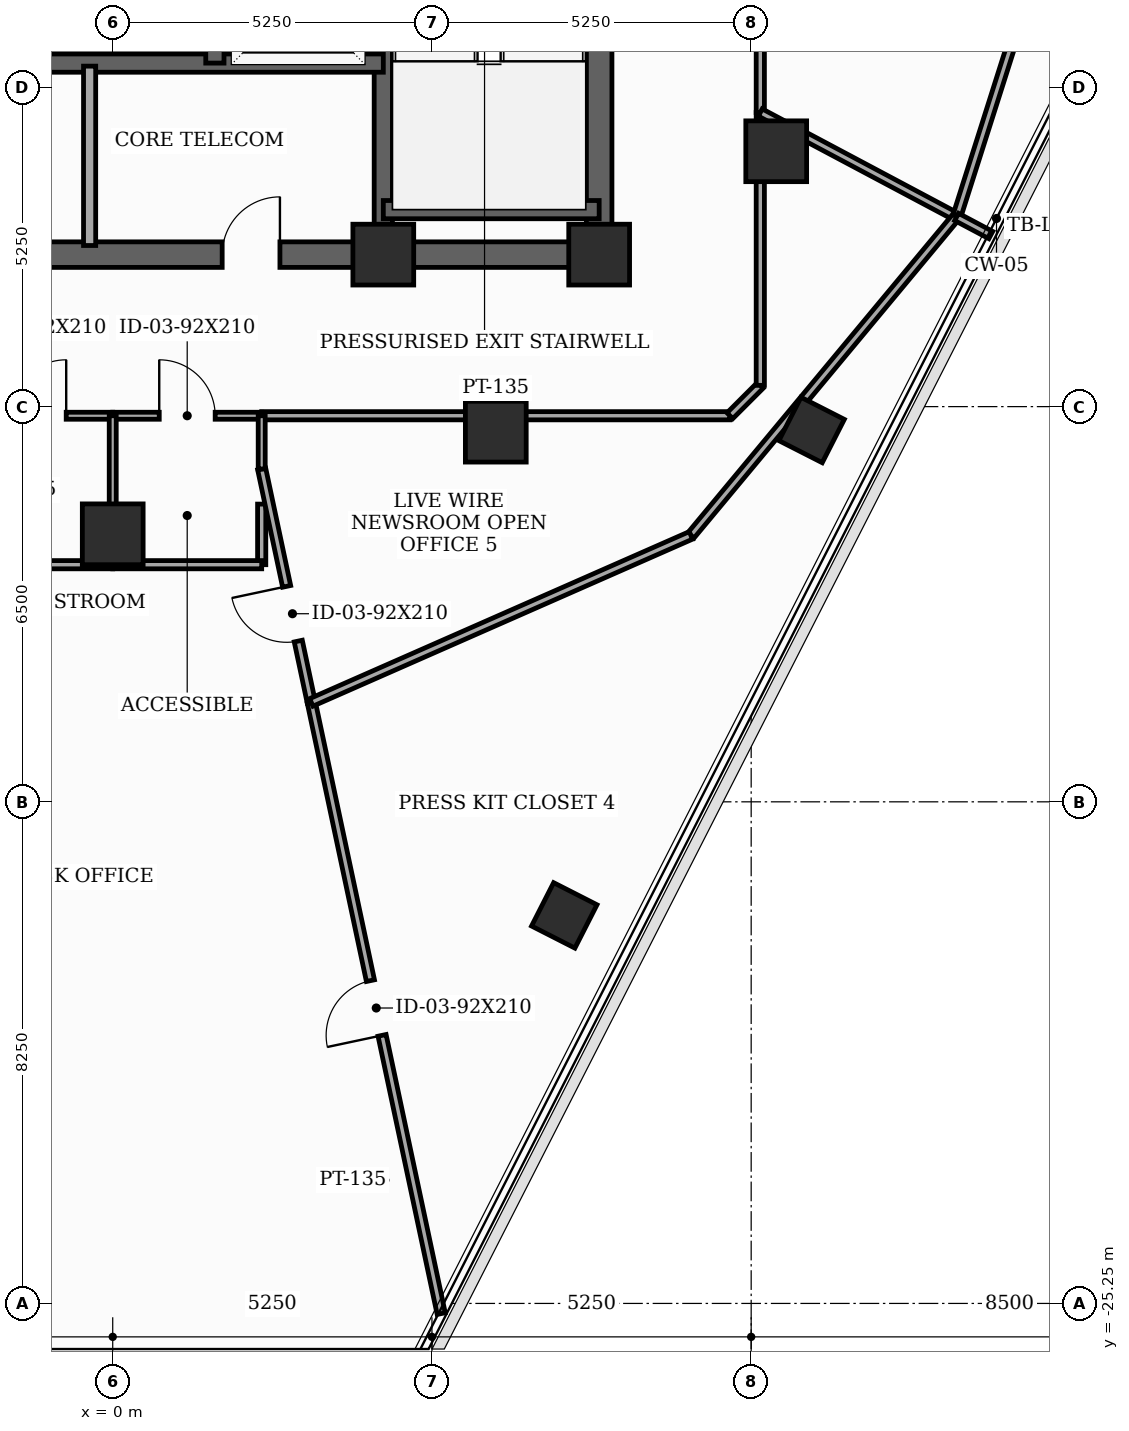
"""IFC4 building model, lengths in metres.
Left out: names, types, materials, properties, quantities, classifications, styles, units other than length and angle.
Written with IfcOpenShell. Run it as: python <this file> out.ifc"""

import sys

from ifc_helpers import new_model, si_unit, direction, frame, frame_2d, origin, origin_2d, place, context, subcontext, project, spatial, rectangle, extrude, element, fill, save


model = new_model("IFC4")
c1 = context("Model", 3, precision=1e-05, world=origin(), true_north=direction((0.0, 1.0)))
c2 = subcontext(c1, "Body", "Model", "MODEL_VIEW")
j1 = project(units=[si_unit("LENGTHUNIT", "METRE"), si_unit("PLANEANGLEUNIT", "RADIAN")], contexts=[c1])
p1 = place(None, origin())
s1 = spatial("IfcSite", under=j1, at=p1, CompositionType="ELEMENT")
p2 = place(p1, origin())
s2 = spatial("IfcBuilding", under=s1, at=p2, CompositionType="ELEMENT")
p3 = place(p2, frame((0.0, 0.0, 259.6)))
s3 = spatial("IfcBuildingStorey", under=s2, at=p3, CompositionType="ELEMENT", Elevation=259.6)
for number, where, z_axis, x_axis in (
    (1, (4.45, -8.0, 0.0), (0.0, 0.0, 1.0), (1.0, 0.0, 0.0)),
    (2, (8.0, -8.0, 0.0), (0.0, 0.0, 1.0), (1.0, 0.0, 0.0)),
    (3, (0.0, -12.6, 0.0), (0.0, 0.0, 1.0), (1.0, 0.0, 0.0)),
    (4, (6.3, -10.912, 0.0), (0.0, 0.0, 1.0), (1.0, 0.0, 0.0)),
    (5, (10.912, -6.3, 0.0), (0.0, 0.0, 1.0), (1.0, 0.0, 0.0)),
):
    element("IfcColumn", number, at=place(p3, frame(where, z_axis=z_axis, x_axis=x_axis)), inside=s3, PredefinedType="COLUMN", context=c2, shape_type="SweptSolid", body=[
        extrude(rectangle(XDim=1.0, YDim=1.0, at=origin_2d()), origin(), (0.0, 0.0, 1.0), 3.7),
    ])
for number, where, z_axis, x_axis in (
    (6, (7.426, -18.868, 0.0), (0.0, 0.0, 1.0), (0.454, 0.891, 0.0)),
    (7, (11.494, -10.885, 0.0), (0.0, 0.0, 1.0), (0.454, 0.891, 0.0)),
):
    element("IfcColumn", number, at=place(p3, frame(where, z_axis=z_axis, x_axis=x_axis)), inside=s3, PredefinedType="COLUMN", context=c2, shape_type="SweptSolid", body=[
        extrude(rectangle(XDim=0.8, YDim=0.8, at=origin_2d()), origin(), (0.0, 0.0, 1.0), 3.7),
    ])
p4 = place(p3, frame((8.0, -8.0, 0.0), z_axis=(0.0, 0.0, 1.0), x_axis=(0.0, 1.0, 0.0)))
e8 = element("IfcWall", 8, at=p4, inside=s3, PredefinedType="SHEAR", context=c2, shape_type="SweptSolid", body=[
    extrude(rectangle(XDim=16.0, YDim=0.42, at=frame_2d((8.0, 0.0))), origin(), (0.0, 0.0, 1.0), 3.5),
])
p5 = place(p4, frame((9.6, 0.0, 0.0)))
e9 = element("IfcOpeningElement", 9, at=p5, cuts=e8, PredefinedType="OPENING", context=c2, shape_type="SweptSolid", body=[
    extrude(rectangle(XDim=1.05, YDim=2.15, at=frame_2d((0.525, 1.075))), frame((0.0, 0.22, 0.0), z_axis=(0.0, -1.0, 0.0), x_axis=(1.0, 0.0, 0.0)), (0.0, 0.0, 1.0), 0.44),
])
p6 = place(p4, frame((14.469, 0.0, 0.0)))
e10 = element("IfcOpeningElement", 10, at=p6, cuts=e8, PredefinedType="OPENING", context=c2, shape_type="SweptSolid", body=[
    extrude(rectangle(XDim=0.85, YDim=2.02, at=frame_2d((0.425, 1.01))), frame((0.0, 0.22, 0.0), z_axis=(0.0, -1.0, 0.0), x_axis=(1.0, 0.0, 0.0)), (0.0, 0.0, 1.0), 0.44),
])
p7 = place(p3, frame((-8.0, -8.0, 0.0), z_axis=(0.0, 0.0, 1.0), x_axis=(1.0, 0.0, 0.0)))
e11 = element("IfcWall", 11, at=p7, inside=s3, PredefinedType="SHEAR", context=c2, shape_type="SweptSolid", body=[
    extrude(rectangle(XDim=16.0, YDim=0.42, at=frame_2d((8.0, 0.0))), origin(), (0.0, 0.0, 1.0), 3.5),
])
p8 = place(p7, frame((5.2, 0.0, 0.0)))
e12 = element("IfcOpeningElement", 12, at=p8, cuts=e11, PredefinedType="OPENING", context=c2, shape_type="SweptSolid", body=[
    extrude(rectangle(XDim=0.95, YDim=2.1, at=frame_2d((0.475, 1.05))), frame((0.0, 0.22, 0.0), z_axis=(0.0, -1.0, 0.0), x_axis=(1.0, 0.0, 0.0)), (0.0, 0.0, 1.0), 0.44),
])
p9 = place(p7, frame((9.8, 0.0, 0.0)))
e13 = element("IfcOpeningElement", 13, at=p9, cuts=e11, PredefinedType="OPENING", context=c2, shape_type="SweptSolid", body=[
    extrude(rectangle(XDim=0.95, YDim=2.1, at=frame_2d((0.475, 1.05))), frame((0.0, 0.22, 0.0), z_axis=(0.0, -1.0, 0.0), x_axis=(1.0, 0.0, 0.0)), (0.0, 0.0, 1.0), 0.44),
])
p10 = place(p3, frame((4.45, -7.79, 0.0), z_axis=(0.0, 0.0, 1.0), x_axis=(0.0, 1.0, 0.0)))
e14 = element("IfcWall", 14, at=p10, inside=s3, PredefinedType="SHEAR", context=c2, shape_type="SweptSolid", body=[
    extrude(rectangle(XDim=15.58, YDim=0.3, at=frame_2d((7.79, 0.0))), origin(), (0.0, 0.0, 1.0), 3.5),
])
p11 = place(p3, frame((4.45, -7.26, 0.0), z_axis=(0.0, 0.0, 1.0), x_axis=(1.0, 0.0, 0.0)))
e15 = element("IfcWall", 15, at=p11, inside=s3, PredefinedType="SHEAR", context=c2, shape_type="SweptSolid", body=[
    extrude(rectangle(XDim=3.55, YDim=0.3, at=frame_2d((1.775, 0.0))), origin(), (0.0, 0.0, 1.0), 3.5),
])
p12 = place(p3, frame((-4.45, -4.85, 0.0), z_axis=(0.0, 0.0, 1.0), x_axis=(1.0, 0.0, 0.0)))
e16 = element("IfcWall", 16, at=p12, inside=s3, PredefinedType="SHEAR", context=c2, shape_type="SweptSolid", body=[
    extrude(rectangle(XDim=8.9, YDim=0.3, at=frame_2d((4.45, 0.0))), origin(), (0.0, 0.0, 1.0), 3.5),
])
p13 = place(p3, frame((1.68, -4.85, 0.0), z_axis=(0.0, 0.0, 1.0), x_axis=(0.0, 1.0, 0.0)))
e17 = element("IfcWall", 17, at=p13, inside=s3, PredefinedType="SHEAR", context=c2, shape_type="SweptSolid", body=[
    extrude(rectangle(XDim=12.64, YDim=0.3, at=frame_2d((6.32, 0.0))), origin(), (0.0, 0.0, 1.0), 3.5),
])
p14 = place(p13, frame((0.55, 0.0, 0.0)))
e18 = element("IfcOpeningElement", 18, at=p14, cuts=e17, PredefinedType="OPENING", context=c2, shape_type="SweptSolid", body=[
    extrude(rectangle(XDim=1.1, YDim=2.1, at=frame_2d((0.55, 1.05))), frame((0.0, 0.16, 0.0), z_axis=(0.0, -1.0, 0.0), x_axis=(1.0, 0.0, 0.0)), (0.0, 0.0, 1.0), 0.32),
])
p15 = place(p13, frame((2.65, 0.0, 0.0)))
e19 = element("IfcOpeningElement", 19, at=p15, cuts=e17, PredefinedType="OPENING", context=c2, shape_type="SweptSolid", body=[
    extrude(rectangle(XDim=1.1, YDim=2.1, at=frame_2d((0.55, 1.05))), frame((0.0, 0.16, 0.0), z_axis=(0.0, -1.0, 0.0), x_axis=(1.0, 0.0, 0.0)), (0.0, 0.0, 1.0), 0.32),
])
p16 = place(p13, frame((4.75, 0.0, 0.0)))
e20 = element("IfcOpeningElement", 20, at=p16, cuts=e17, PredefinedType="OPENING", context=c2, shape_type="SweptSolid", body=[
    extrude(rectangle(XDim=1.1, YDim=2.1, at=frame_2d((0.55, 1.05))), frame((0.0, 0.16, 0.0), z_axis=(0.0, -1.0, 0.0), x_axis=(1.0, 0.0, 0.0)), (0.0, 0.0, 1.0), 0.32),
])
p17 = place(p13, frame((8.2, 0.0, 0.0)))
e21 = element("IfcOpeningElement", 21, at=p17, cuts=e17, PredefinedType="OPENING", context=c2, shape_type="SweptSolid", body=[
    extrude(rectangle(XDim=0.95, YDim=2.1, at=frame_2d((0.475, 1.05))), frame((0.0, 0.16, 0.0), z_axis=(0.0, -1.0, 0.0), x_axis=(1.0, 0.0, 0.0)), (0.0, 0.0, 1.0), 0.32),
])
p18 = place(p13, frame((11.25, 0.0, 0.0)))
e22 = element("IfcOpeningElement", 22, at=p18, cuts=e17, PredefinedType="OPENING", context=c2, shape_type="SweptSolid", body=[
    extrude(rectangle(XDim=0.95, YDim=2.1, at=frame_2d((0.475, 1.05))), frame((0.0, 0.16, 0.0), z_axis=(0.0, -1.0, 0.0), x_axis=(1.0, 0.0, 0.0)), (0.0, 0.0, 1.0), 0.32),
])
p19 = place(p3, frame((-0.38, -7.85, 0.0), z_axis=(0.0, 0.0, 1.0), x_axis=(0.0, 1.0, 0.0)))
e23 = element("IfcWall", 23, at=p19, inside=s3, PredefinedType="SOLIDWALL", context=c2, shape_type="SweptSolid", body=[
    extrude(rectangle(XDim=2.95, YDim=0.2, at=frame_2d((1.475, 0.0))), origin(), (0.0, 0.0, 1.0), 2.885),
])
p20 = place(p3, frame((10.65, -5.663, 0.0), z_axis=(0.0, 0.0, 1.0), x_axis=(0.0, 1.0, 0.0)))
e24 = element("IfcWall", 24, at=p20, inside=s3, PredefinedType="PARTITIONING", context=c2, shape_type="SweptSolid", body=[
    extrude(rectangle(XDim=7.145, YDim=0.135, at=frame_2d((3.573, 0.0))), origin(), (0.0, 0.0, 1.0), 2.885),
])
p21 = place(p20, frame((3.097, 0.0, 0.0)))
e25 = element("IfcOpeningElement", 25, at=p21, cuts=e24, PredefinedType="OPENING", context=c2, shape_type="SweptSolid", body=[
    extrude(rectangle(XDim=0.95, YDim=2.1, at=frame_2d((0.475, 1.05))), frame((0.0, 0.077, 0.0), z_axis=(0.0, -1.0, 0.0), x_axis=(1.0, 0.0, 0.0)), (0.0, 0.0, 1.0), 0.155),
])
p22 = place(p3, frame((-2.45, -10.65, 0.0), z_axis=(0.0, 0.0, 1.0), x_axis=(1.0, 0.0, 0.0)))
e26 = element("IfcWall", 26, at=p22, inside=s3, PredefinedType="PARTITIONING", context=c2, shape_type="SweptSolid", body=[
    extrude(rectangle(XDim=2.45, YDim=0.115, at=frame_2d((1.225, 0.0))), origin(), (0.0, 0.0, 1.0), 2.885),
])
p23 = place(p22, frame((0.765, 0.0, 0.0)))
e27 = element("IfcOpeningElement", 27, at=p23, cuts=e26, PredefinedType="OPENING", context=c2, shape_type="SweptSolid", body=[
    extrude(rectangle(XDim=0.92, YDim=2.1, at=frame_2d((0.46, 1.05))), frame((0.0, 0.067, 0.0), z_axis=(0.0, -1.0, 0.0), x_axis=(1.0, 0.0, 0.0)), (0.0, 0.0, 1.0), 0.135),
])
p24 = place(p3, frame((0.0, -10.65, 0.0), z_axis=(0.0, 0.0, 1.0), x_axis=(1.0, 0.0, 0.0)))
e28 = element("IfcWall", 28, at=p24, inside=s3, PredefinedType="PARTITIONING", context=c2, shape_type="SweptSolid", body=[
    extrude(rectangle(XDim=2.45, YDim=0.115, at=frame_2d((1.225, 0.0))), origin(), (0.0, 0.0, 1.0), 3.5),
])
p25 = place(p24, frame((0.765, 0.0, 0.0)))
e29 = element("IfcOpeningElement", 29, at=p25, cuts=e28, PredefinedType="OPENING", context=c2, shape_type="SweptSolid", body=[
    extrude(rectangle(XDim=0.92, YDim=2.1, at=frame_2d((0.46, 1.05))), frame((0.0, 0.067, 0.0), z_axis=(0.0, -1.0, 0.0), x_axis=(1.0, 0.0, 0.0)), (0.0, 0.0, 1.0), 0.135),
])
p26 = place(p3, frame((2.45, -10.65, 0.0), z_axis=(0.0, 0.0, 1.0), x_axis=(1.0, 0.0, 0.0)))
e30 = element("IfcWall", 30, at=p26, inside=s3, PredefinedType="PARTITIONING", context=c2, shape_type="SweptSolid", body=[
    extrude(rectangle(XDim=7.7, YDim=0.135, at=frame_2d((3.85, 0.0))), origin(), (0.0, 0.0, 1.0), 2.885),
])
p27 = place(p3, frame((10.15, -10.65, 0.0), z_axis=(0.0, 0.0, 1.0), x_axis=(0.707106781187, 0.707106781187, 0.0)))
e31 = element("IfcWall", 31, at=p27, inside=s3, PredefinedType="PARTITIONING", context=c2, shape_type="SweptSolid", body=[
    extrude(rectangle(XDim=0.707, YDim=0.135, at=frame_2d((0.354, 0.0))), origin(), (0.0, 0.0, 1.0), 3.5),
])
p28 = place(p3, frame((10.65, -10.15, 0.0), z_axis=(0.0, 0.0, 1.0), x_axis=(0.0, 1.0, 0.0)))
e32 = element("IfcWall", 32, at=p28, inside=s3, PredefinedType="PARTITIONING", context=c2, shape_type="SweptSolid", body=[
    extrude(rectangle(XDim=4.487, YDim=0.135, at=frame_2d((2.243, 0.0))), origin(), (0.0, 0.0, 1.0), 2.885),
])
p29 = place(p3, frame((10.65, -5.663, 0.0), z_axis=(0.0, 0.0, 1.0), x_axis=(0.882982204984, -0.469406461057, 0.0)))
e33 = element("IfcWall", 33, at=p29, inside=s3, PredefinedType="PARTITIONING", context=c2, shape_type="SweptSolid", body=[
    extrude(rectangle(XDim=3.647, YDim=0.135, at=frame_2d((1.823, 0.0))), origin(), (0.0, 0.0, 1.0), 2.885),
])
p30 = place(p3, frame((13.887, -7.354, 0.0), z_axis=(0.0, 0.0, 1.0), x_axis=(0.302867480059, 0.953032680197, 0.0)))
e34 = element("IfcWall", 34, at=p30, inside=s3, PredefinedType="PARTITIONING", context=c2, shape_type="SweptSolid", body=[
    extrude(rectangle(XDim=6.055, YDim=0.135, at=frame_2d((3.028, 0.0))), origin(), (0.0, 0.0, 1.0), 3.035),
])
p31 = place(p3, frame((0.0, -13.1, 0.0), z_axis=(0.0, 0.0, 1.0), x_axis=(-1.0, 0.0, 0.0)))
e35 = element("IfcWall", 35, at=p31, inside=s3, PredefinedType="PARTITIONING", context=c2, shape_type="SweptSolid", body=[
    extrude(rectangle(XDim=2.45, YDim=0.135, at=frame_2d((1.225, 0.0))), origin(), (0.0, 0.0, 1.0), 3.5),
])
p32 = place(p3, frame((2.45, -12.103, 0.0), z_axis=(0.0, 0.0, 1.0), x_axis=(0.0, -1.0, 0.0)))
e36 = element("IfcWall", 36, at=p32, inside=s3, PredefinedType="PARTITIONING", context=c2, shape_type="SweptSolid", body=[
    extrude(rectangle(XDim=0.997, YDim=0.135, at=frame_2d((0.499, 0.0))), origin(), (0.0, 0.0, 1.0), 2.885),
])
p33 = place(p3, frame((2.45, -13.1, 0.0), z_axis=(0.0, 0.0, 1.0), x_axis=(-1.0, 0.0, 0.0)))
e37 = element("IfcWall", 37, at=p33, inside=s3, PredefinedType="PARTITIONING", context=c2, shape_type="SweptSolid", body=[
    extrude(rectangle(XDim=2.45, YDim=0.135, at=frame_2d((1.225, 0.0))), origin(), (0.0, 0.0, 1.0), 3.5),
])
p34 = place(p3, frame((5.402, -25.417, 0.0), z_axis=(0.0, 0.0, 1.0), x_axis=(-0.207847958891, 0.978161145203, 0.0)))
e38 = element("IfcWall", 38, at=p34, inside=s3, PredefinedType="PARTITIONING", context=c2, shape_type="SweptSolid", body=[
    extrude(rectangle(XDim=10.277, YDim=0.135, at=frame_2d((5.138, 0.0))), origin(), (0.0, 0.0, 1.0), 3.035),
])
p35 = place(p34, frame((4.678, 0.0, 0.0)))
e39 = element("IfcOpeningElement", 39, at=p35, cuts=e38, PredefinedType="OPENING", context=c2, shape_type="SweptSolid", body=[
    extrude(rectangle(XDim=0.92, YDim=2.1, at=frame_2d((0.46, 1.05))), frame((0.0, 0.077, 0.0), z_axis=(0.0, -1.0, 0.0), x_axis=(1.0, 0.0, 0.0)), (0.0, 0.0, 1.0), 0.155),
])
p36 = place(p3, frame((3.266, -15.365, 0.0), z_axis=(0.0, 0.0, 1.0), x_axis=(-0.207944308429, 0.978140667078, 0.0)))
e40 = element("IfcWall", 40, at=p36, inside=s3, PredefinedType="PARTITIONING", context=c2, shape_type="SweptSolid", body=[
    extrude(rectangle(XDim=3.925, YDim=0.135, at=frame_2d((1.962, 0.0))), origin(), (0.0, 0.0, 1.0), 2.885),
])
p37 = place(p36, frame((1.031, 0.0, 0.0)))
e41 = element("IfcOpeningElement", 41, at=p37, cuts=e40, PredefinedType="OPENING", context=c2, shape_type="SweptSolid", body=[
    extrude(rectangle(XDim=0.92, YDim=2.1, at=frame_2d((0.46, 1.05))), frame((0.0, 0.077, 0.0), z_axis=(0.0, -1.0, 0.0), x_axis=(1.0, 0.0, 0.0)), (0.0, 0.0, 1.0), 0.155),
])
p38 = place(p3, frame((0.0, -13.1, 0.0), z_axis=(0.0, 0.0, 1.0), x_axis=(0.0, 1.0, 0.0)))
e42 = element("IfcWall", 42, at=p38, inside=s3, PredefinedType="PARTITIONING", context=c2, shape_type="SweptSolid", body=[
    extrude(rectangle(XDim=2.45, YDim=0.115, at=frame_2d((1.225, 0.0))), origin(), (0.0, 0.0, 1.0), 2.885),
])
p39 = place(p3, frame((2.45, -11.526, 0.0), z_axis=(0.0, 0.0, 1.0), x_axis=(0.0, 1.0, 0.0)))
e43 = element("IfcWall", 43, at=p39, inside=s3, PredefinedType="PARTITIONING", context=c2, shape_type="SweptSolid", body=[
    extrude(rectangle(XDim=0.876, YDim=0.115, at=frame_2d((0.438, 0.0))), origin(), (0.0, 0.0, 1.0), 3.5),
])
p40 = place(p3, frame((13.87, -7.375, 0.0), z_axis=(0.0, 0.0, 1.0), x_axis=(-0.63949044568, -0.768799043888, 0.0)))
e44 = element("IfcWall", 44, at=p40, inside=s3, PredefinedType="PARTITIONING", context=c2, shape_type="SweptSolid", body=[
    extrude(rectangle(XDim=6.82, YDim=0.135, at=frame_2d((3.41, 0.0))), origin(), (0.0, 0.0, 1.0), 3.035),
])
p41 = place(p3, frame((9.509, -12.618, 0.0), z_axis=(0.0, 0.0, 1.0), x_axis=(-0.915305003879, -0.402761405641, 0.0)))
e45 = element("IfcWall", 45, at=p41, inside=s3, PredefinedType="PARTITIONING", context=c2, shape_type="SweptSolid", body=[
    extrude(rectangle(XDim=6.821, YDim=0.135, at=frame_2d((3.41, 0.0))), origin(), (0.0, 0.0, 1.0), 3.035),
])
p42 = place(p3, frame((14.441, -7.678, 0.0), z_axis=(0.0, 0.0, 1.0), x_axis=(-0.883423592085, 0.468575241501, 0.0)))
e46 = element("IfcWall", 46, at=p42, inside=s3, PredefinedType="PARTITIONING", context=c2, shape_type="SweptSolid", body=[
    extrude(rectangle(XDim=0.636, YDim=0.135, at=frame_2d((0.318, 0.0))), origin(), (0.0, 0.0, 1.0), 3.5),
])
p43 = place(p9, origin())
e47 = element("IfcDoor", 47, at=p43, inside=s3, OperationType="SINGLE_SWING_RIGHT", PredefinedType="DOOR", context=c2, shape_type="SweptSolid", body=[
    extrude(rectangle(XDim=0.95, YDim=2.1, at=frame_2d((0.475, 1.05))), frame((0.0, 0.025, 0.0), z_axis=(0.0, -1.0, 0.0), x_axis=(1.0, 0.0, 0.0)), (0.0, 0.0, 1.0), 0.05),
])
fill(e13, e47)
p44 = place(p23, origin())
e48 = element("IfcDoor", 48, at=p44, inside=s3, OperationType="SINGLE_SWING_RIGHT", PredefinedType="DOOR", context=c2, shape_type="SweptSolid", body=[
    extrude(rectangle(XDim=0.92, YDim=2.1, at=frame_2d((0.46, 1.05))), frame((0.0, 0.025, 0.0), z_axis=(0.0, -1.0, 0.0), x_axis=(1.0, 0.0, 0.0)), (0.0, 0.0, 1.0), 0.05),
])
fill(e27, e48)
p45 = place(p25, origin())
e49 = element("IfcDoor", 49, at=p45, inside=s3, OperationType="SINGLE_SWING_LEFT", PredefinedType="DOOR", context=c2, shape_type="SweptSolid", body=[
    extrude(rectangle(XDim=0.92, YDim=2.1, at=frame_2d((0.46, 1.05))), frame((0.0, 0.025, 0.0), z_axis=(0.0, -1.0, 0.0), x_axis=(1.0, 0.0, 0.0)), (0.0, 0.0, 1.0), 0.05),
])
fill(e29, e49)
p46 = place(p35, origin())
e50 = element("IfcDoor", 50, at=p46, inside=s3, OperationType="SINGLE_SWING_LEFT", PredefinedType="DOOR", context=c2, shape_type="SweptSolid", body=[
    extrude(rectangle(XDim=0.92, YDim=2.1, at=frame_2d((0.46, 1.05))), frame((0.0, 0.025, 0.0), z_axis=(0.0, -1.0, 0.0), x_axis=(1.0, 0.0, 0.0)), (0.0, 0.0, 1.0), 0.05),
])
fill(e39, e50)
p47 = place(p37, origin())
e51 = element("IfcDoor", 51, at=p47, inside=s3, OperationType="SINGLE_SWING_RIGHT", PredefinedType="DOOR", context=c2, shape_type="SweptSolid", body=[
    extrude(rectangle(XDim=0.92, YDim=2.1, at=frame_2d((0.46, 1.05))), frame((0.0, 0.025, 0.0), z_axis=(0.0, -1.0, 0.0), x_axis=(1.0, 0.0, 0.0)), (0.0, 0.0, 1.0), 0.05),
])
fill(e41, e51)
save(model, sys.argv[1])
